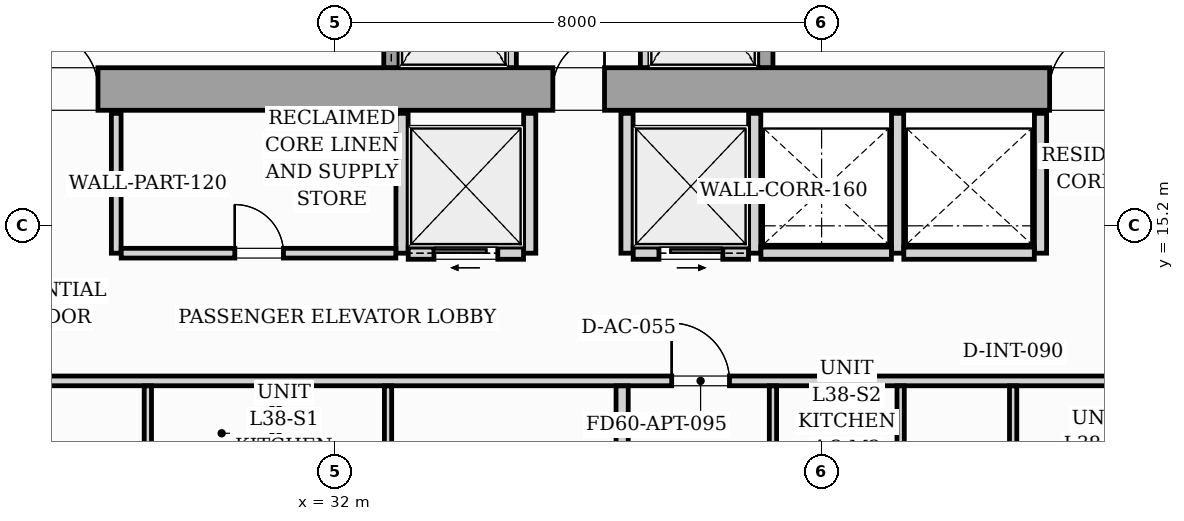
"""IFC4 building model, lengths in metres.
Left out: names, types, materials, properties, quantities, classifications, styles, units other than length and angle.
Written with IfcOpenShell. Run it as: python <this file> out.ifc"""

import sys

from ifc_helpers import new_model, si_unit, direction, frame, frame_2d, origin, origin_2d, place, context, subcontext, project, spatial, rectangle, i_section, extrude, source, transform, mapped, element, fill, save


model = new_model("IFC4")
c1 = context("Model", 3, precision=1e-05, world=origin(), true_north=direction((0.0, 1.0)))
c2 = subcontext(c1, "Body", "Model", "MODEL_VIEW")
j1 = project(units=[si_unit("LENGTHUNIT", "METRE"), si_unit("PLANEANGLEUNIT", "RADIAN")], contexts=[c1])
p1 = place(None, origin())
s1 = spatial("IfcSite", under=j1, at=p1, CompositionType="ELEMENT")
p2 = place(p1, origin())
s2 = spatial("IfcBuilding", under=s1, at=p2, CompositionType="ELEMENT")
p3 = place(p2, frame((0.0, 0.0, 134.2)))
s3 = spatial("IfcBuildingStorey", under=s2, at=p3, CompositionType="ELEMENT", Elevation=134.2)
m1 = source(origin(), c2, "Body", "SweptSolid", [
    extrude(i_section(OverallWidth=0.421, OverallDepth=0.465, WebThickness=0.045, FlangeThickness=0.073, FilletRadius=0.018, at=origin_2d()), origin(), (0.0, 0.0, 1.0), 3.196),
])
for number, where, z_axis, x_axis in (
    (1, (33.12, 17.4, 0.002), (0.0, 0.0, 1.0), (1.0, 0.0, 0.0)),
    (2, (38.88, 17.4, 0.002), (0.0, 0.0, 1.0), (1.0, 0.0, 0.0)),
):
    element("IfcColumn", number, at=place(p3, frame(where, z_axis=z_axis, x_axis=x_axis)), inside=s3, PredefinedType="PILASTER", context=c2, shape_type="MappedRepresentation", body=[
        mapped(m1, transform((0.0, 0.0, 0.0), scale=1.0)),
    ])
p4 = place(p3, frame((26.1, 17.45, 0.0), z_axis=(0.0, 0.0, 1.0), x_axis=(1.0, 0.0, 0.0)))
e3 = element("IfcWall", 3, at=p4, inside=s3, PredefinedType="SHEAR", context=c2, shape_type="SweptSolid", body=[
    extrude(rectangle(XDim=19.8, YDim=0.7, at=frame_2d((9.9, 0.0))), origin(), (0.0, 0.0, 1.0), 3.2),
])
p5 = place(p4, frame((1.05, 0.0, 0.0)))
e4 = element("IfcOpeningElement", 4, at=p5, cuts=e3, PredefinedType="OPENING", context=c2, shape_type="SweptSolid", body=[
    extrude(rectangle(XDim=0.95, YDim=2.06, at=frame_2d((0.475, 1.03))), frame((0.0, 0.36, 0.0), z_axis=(0.0, -1.0, 0.0), x_axis=(1.0, 0.0, 0.0)), (0.0, 0.0, 1.0), 0.72),
])
p6 = place(p4, frame((9.48, 0.0, 0.0)))
e5 = element("IfcOpeningElement", 5, at=p6, cuts=e3, PredefinedType="OPENING", context=c2, shape_type="SweptSolid", body=[
    extrude(rectangle(XDim=0.85, YDim=2.0, at=frame_2d((0.425, 1.0))), frame((0.0, 0.36, 0.0), z_axis=(0.0, -1.0, 0.0), x_axis=(1.0, 0.0, 0.0)), (0.0, 0.0, 1.0), 0.72),
])
p7 = place(p4, frame((17.65, 0.0, 0.0)))
e6 = element("IfcOpeningElement", 6, at=p7, cuts=e3, PredefinedType="OPENING", context=c2, shape_type="SweptSolid", body=[
    extrude(rectangle(XDim=0.95, YDim=2.06, at=frame_2d((0.475, 1.03))), frame((0.0, 0.36, 0.0), z_axis=(0.0, -1.0, 0.0), x_axis=(1.0, 0.0, 0.0)), (0.0, 0.0, 1.0), 0.72),
])
p8 = place(p3, frame((32.925, 17.802, 0.0), z_axis=(0.0, 0.0, 1.0), x_axis=(0.0, 1.0, 0.0)))
e7 = element("IfcWall", 7, at=p8, inside=s3, PredefinedType="SOLIDWALL", context=c2, shape_type="SweptSolid", body=[
    extrude(rectangle(XDim=2.646, YDim=0.25, at=frame_2d((1.323, 0.0))), origin(), (0.0, 0.0, 1.0), 3.2),
])
p9 = place(p8, frame((0.598, 0.0, 0.0)))
e8 = element("IfcOpeningElement", 8, at=p9, cuts=e7, PredefinedType="OPENING", context=c2, shape_type="SweptSolid", body=[
    extrude(rectangle(XDim=1.1, YDim=2.08, at=frame_2d((0.55, 1.04))), frame((0.0, 0.135, 0.0), z_axis=(0.0, -1.0, 0.0), x_axis=(1.0, 0.0, 0.0)), (0.0, 0.0, 1.0), 0.27),
])
for number, where, z_axis, x_axis in (
    (9, (34.9, 17.802, 0.0), (0.0, 0.0, 1.0), (0.0, 1.0, 0.0)),
    (10, (37.1, 17.802, 0.0), (0.0, 0.0, 1.0), (0.0, 1.0, 0.0)),
):
    element("IfcWall", number, at=place(p3, frame(where, z_axis=z_axis, x_axis=x_axis)), inside=s3, PredefinedType="PARTITIONING", context=c2, shape_type="SweptSolid", body=[
        extrude(rectangle(XDim=2.646, YDim=0.16, at=frame_2d((1.323, 0.0))), origin(), (0.0, 0.0, 1.0), 2.94),
    ])
p10 = place(p3, frame((39.075, 17.802, 0.0), z_axis=(0.0, 0.0, 1.0), x_axis=(0.0, 1.0, 0.0)))
e11 = element("IfcWall", 11, at=p10, inside=s3, PredefinedType="SOLIDWALL", context=c2, shape_type="SweptSolid", body=[
    extrude(rectangle(XDim=2.646, YDim=0.25, at=frame_2d((1.323, 0.0))), origin(), (0.0, 0.0, 1.0), 3.2),
])
p11 = place(p10, frame((0.598, 0.0, 0.0)))
e12 = element("IfcOpeningElement", 12, at=p11, cuts=e11, PredefinedType="OPENING", context=c2, shape_type="SweptSolid", body=[
    extrude(rectangle(XDim=1.1, YDim=2.08, at=frame_2d((0.55, 1.04))), frame((0.0, 0.135, 0.0), z_axis=(0.0, -1.0, 0.0), x_axis=(1.0, 0.0, 0.0)), (0.0, 0.0, 1.0), 0.27),
])
p12 = place(p3, frame((28.4, 14.75, 0.0), z_axis=(0.0, 0.0, 1.0), x_axis=(0.0, 1.0, 0.0)))
e13 = element("IfcWall", 13, at=p12, inside=s3, PredefinedType="PARTITIONING", context=c2, shape_type="SweptSolid", body=[
    extrude(rectangle(XDim=2.3, YDim=0.16, at=frame_2d((1.15, 0.0))), origin(), (0.0, 0.0, 1.0), 2.94),
])
p13 = place(p3, frame((33.1, 14.75, 0.0), z_axis=(0.0, 0.0, 1.0), x_axis=(0.0, 1.0, 0.0)))
e14 = element("IfcWall", 14, at=p13, inside=s3, PredefinedType="PARTITIONING", context=c2, shape_type="SweptSolid", body=[
    extrude(rectangle(XDim=2.3, YDim=0.2, at=frame_2d((1.15, 0.0))), origin(), (0.0, 0.0, 1.0), 2.94),
])
p14 = place(p3, frame((28.482, 14.75, 0.0), z_axis=(0.0, 0.0, 1.0), x_axis=(1.0, 0.0, 0.0)))
e15 = element("IfcWall", 15, at=p14, inside=s3, PredefinedType="PARTITIONING", context=c2, shape_type="SweptSolid", body=[
    extrude(rectangle(XDim=4.516, YDim=0.16, at=frame_2d((2.258, 0.0))), origin(), (0.0, 0.0, 1.0), 2.94),
])
p15 = place(p14, frame((1.868, 0.0, 0.0)))
e16 = element("IfcOpeningElement", 16, at=p15, cuts=e15, PredefinedType="OPENING", context=c2, shape_type="SweptSolid", body=[
    extrude(rectangle(XDim=0.8, YDim=2.05, at=frame_2d((0.4, 1.025))), frame((0.0, 0.09, 0.0), z_axis=(0.0, -1.0, 0.0), x_axis=(1.0, 0.0, 0.0)), (0.0, 0.0, 1.0), 0.18),
])
p16 = place(p3, frame((35.2, 14.75, 0.0), z_axis=(0.0, 0.0, 1.0), x_axis=(0.0, 1.0, 0.0)))
e17 = element("IfcWall", 17, at=p16, inside=s3, PredefinedType="PARTITIONING", context=c2, shape_type="SweptSolid", body=[
    extrude(rectangle(XDim=2.3, YDim=0.2, at=frame_2d((1.15, 0.0))), origin(), (0.0, 0.0, 1.0), 2.94),
])
p17 = place(p3, frame((33.202, 14.75, 0.0), z_axis=(0.0, 0.0, 1.0), x_axis=(1.0, 0.0, 0.0)))
e18 = element("IfcWall", 18, at=p17, inside=s3, PredefinedType="PARTITIONING", context=c2, shape_type="SweptSolid", body=[
    extrude(rectangle(XDim=1.896, YDim=0.2, at=frame_2d((0.948, 0.0))), origin(), (0.0, 0.0, 1.0), 2.94),
])
p18 = place(p17, frame((0.423, 0.0, 0.0)))
e19 = element("IfcOpeningElement", 19, at=p18, cuts=e18, PredefinedType="OPENING", context=c2, shape_type="SweptSolid", body=[
    extrude(rectangle(XDim=1.05, YDim=2.08, at=frame_2d((0.525, 1.04))), frame((0.0, 0.11, 0.0), z_axis=(0.0, -1.0, 0.0), x_axis=(1.0, 0.0, 0.0)), (0.0, 0.0, 1.0), 0.22),
])
for number, where, z_axis, x_axis in (
    (20, (36.8, 14.75, 0.0), (0.0, 0.0, 1.0), (0.0, 1.0, 0.0)),
    (21, (38.9, 14.75, 0.0), (0.0, 0.0, 1.0), (0.0, 1.0, 0.0)),
):
    element("IfcWall", number, at=place(p3, frame(where, z_axis=z_axis, x_axis=x_axis)), inside=s3, PredefinedType="PARTITIONING", context=c2, shape_type="SweptSolid", body=[
        extrude(rectangle(XDim=2.3, YDim=0.2, at=frame_2d((1.15, 0.0))), origin(), (0.0, 0.0, 1.0), 2.94),
    ])
p19 = place(p3, frame((36.902, 14.75, 0.0), z_axis=(0.0, 0.0, 1.0), x_axis=(1.0, 0.0, 0.0)))
e22 = element("IfcWall", 22, at=p19, inside=s3, PredefinedType="PARTITIONING", context=c2, shape_type="SweptSolid", body=[
    extrude(rectangle(XDim=1.896, YDim=0.2, at=frame_2d((0.948, 0.0))), origin(), (0.0, 0.0, 1.0), 2.94),
])
p20 = place(p19, frame((0.423, 0.0, 0.0)))
e23 = element("IfcOpeningElement", 23, at=p20, cuts=e22, PredefinedType="OPENING", context=c2, shape_type="SweptSolid", body=[
    extrude(rectangle(XDim=1.05, YDim=2.08, at=frame_2d((0.525, 1.04))), frame((0.0, 0.11, 0.0), z_axis=(0.0, -1.0, 0.0), x_axis=(1.0, 0.0, 0.0)), (0.0, 0.0, 1.0), 0.22),
])
for number, where, z_axis, x_axis in (
    (24, (41.25, 14.75, 0.0), (0.0, 0.0, 1.0), (0.0, 1.0, 0.0)),
    (25, (43.6, 14.75, 0.0), (0.0, 0.0, 1.0), (0.0, 1.0, 0.0)),
):
    element("IfcWall", number, at=place(p3, frame(where, z_axis=z_axis, x_axis=x_axis)), inside=s3, PredefinedType="PARTITIONING", context=c2, shape_type="SweptSolid", body=[
        extrude(rectangle(XDim=2.3, YDim=0.2, at=frame_2d((1.15, 0.0))), origin(), (0.0, 0.0, 1.0), 2.94),
    ])
for number, where, z_axis, x_axis in (
    (26, (39.002, 14.75, 0.0), (0.0, 0.0, 1.0), (1.0, 0.0, 0.0)),
    (27, (41.352, 14.75, 0.0), (0.0, 0.0, 1.0), (1.0, 0.0, 0.0)),
):
    element("IfcWall", number, at=place(p3, frame(where, z_axis=z_axis, x_axis=x_axis)), inside=s3, PredefinedType="PARTITIONING", context=c2, shape_type="SweptSolid", body=[
        extrude(rectangle(XDim=2.146, YDim=0.2, at=frame_2d((1.073, 0.0))), origin(), (0.0, 0.0, 1.0), 2.94),
    ])
p21 = place(p3, frame((22.05, 12.65, 0.0), z_axis=(0.0, 0.0, 1.0), x_axis=(1.0, 0.0, 0.0)))
e28 = element("IfcWall", 28, at=p21, inside=s3, PredefinedType="PARTITIONING", context=c2, shape_type="SweptSolid", body=[
    extrude(rectangle(XDim=23.83, YDim=0.16, at=frame_2d((11.915, 0.0))), origin(), (0.0, 0.0, 1.0), 2.94),
])
p22 = place(p21, frame((3.0, 0.0, 0.0)))
e29 = element("IfcOpeningElement", 29, at=p22, cuts=e28, PredefinedType="OPENING", context=c2, shape_type="SweptSolid", body=[
    extrude(rectangle(XDim=0.95, YDim=2.06, at=frame_2d((0.475, 1.03))), frame((0.0, 0.09, 0.0), z_axis=(0.0, -1.0, 0.0), x_axis=(1.0, 0.0, 0.0)), (0.0, 0.0, 1.0), 0.18),
])
p23 = place(p21, frame((15.485, 0.0, 0.0)))
e30 = element("IfcOpeningElement", 30, at=p23, cuts=e28, PredefinedType="OPENING", context=c2, shape_type="SweptSolid", body=[
    extrude(rectangle(XDim=0.95, YDim=2.06, at=frame_2d((0.475, 1.03))), frame((0.0, 0.09, 0.0), z_axis=(0.0, -1.0, 0.0), x_axis=(1.0, 0.0, 0.0)), (0.0, 0.0, 1.0), 0.18),
])
p24 = place(p3, frame((32.87, 7.028, 0.0), z_axis=(0.0, 0.0, 1.0), x_axis=(0.0, 1.0, 0.0)))
e31 = element("IfcWall", 31, at=p24, inside=s3, PredefinedType="PARTITIONING", context=c2, shape_type="SweptSolid", body=[
    extrude(rectangle(XDim=5.54, YDim=0.12, at=frame_2d((2.77, 0.0))), origin(), (0.0, 0.0, 1.0), 2.94),
])
p25 = place(p24, frame((2.272, 0.0, 0.0)))
e32 = element("IfcOpeningElement", 32, at=p25, cuts=e31, PredefinedType="OPENING", context=c2, shape_type="SweptSolid", body=[
    extrude(rectangle(XDim=0.9, YDim=2.05, at=frame_2d((0.45, 1.025))), frame((0.0, 0.07, 0.0), z_axis=(0.0, -1.0, 0.0), x_axis=(1.0, 0.0, 0.0)), (0.0, 0.0, 1.0), 0.14),
])
for number, where, z_axis, x_axis in (
    (33, (31.02, 10.462, 0.0), (0.0, 0.0, 1.0), (0.0, 1.0, 0.0)),
    (34, (28.92, 10.462, 0.0), (0.0, 0.0, 1.0), (0.0, 1.0, 0.0)),
):
    element("IfcWall", number, at=place(p3, frame(where, z_axis=z_axis, x_axis=x_axis)), inside=s3, PredefinedType="PARTITIONING", context=c2, shape_type="SweptSolid", body=[
        extrude(rectangle(XDim=2.106, YDim=0.12, at=frame_2d((1.053, 0.0))), origin(), (0.0, 0.0, 1.0), 2.94),
    ])
p26 = place(p3, frame((36.72, 6.658, 0.0), z_axis=(0.0, 0.0, 1.0), x_axis=(0.0, 1.0, 0.0)))
e35 = element("IfcWall", 35, at=p26, inside=s3, PredefinedType="PARTITIONING", context=c2, shape_type="SweptSolid", body=[
    extrude(rectangle(XDim=5.91, YDim=0.2, at=frame_2d((2.955, 0.0))), origin(), (0.0, 0.0, 1.0), 2.94),
])
p27 = place(p3, frame((43.15, 6.221, 0.0), z_axis=(0.0, 0.0, 1.0), x_axis=(0.0, 1.0, 0.0)))
e36 = element("IfcWall", 36, at=p27, inside=s3, PredefinedType="PARTITIONING", context=c2, shape_type="SweptSolid", body=[
    extrude(rectangle(XDim=6.347, YDim=0.12, at=frame_2d((3.173, 0.0))), origin(), (0.0, 0.0, 1.0), 2.94),
])
p28 = place(p27, frame((3.079, 0.0, 0.0)))
e37 = element("IfcOpeningElement", 37, at=p28, cuts=e36, PredefinedType="OPENING", context=c2, shape_type="SweptSolid", body=[
    extrude(rectangle(XDim=0.9, YDim=2.05, at=frame_2d((0.45, 1.025))), frame((0.0, 0.07, 0.0), z_axis=(0.0, -1.0, 0.0), x_axis=(1.0, 0.0, 0.0)), (0.0, 0.0, 1.0), 0.14),
])
for number, where, z_axis, x_axis in (
    (38, (41.3, 10.462, 0.0), (0.0, 0.0, 1.0), (0.0, 1.0, 0.0)),
    (39, (39.2, 10.462, 0.0), (0.0, 0.0, 1.0), (0.0, 1.0, 0.0)),
):
    element("IfcWall", number, at=place(p3, frame(where, z_axis=z_axis, x_axis=x_axis)), inside=s3, PredefinedType="PARTITIONING", context=c2, shape_type="SweptSolid", body=[
        extrude(rectangle(XDim=2.106, YDim=0.12, at=frame_2d((1.053, 0.0))), origin(), (0.0, 0.0, 1.0), 2.94),
    ])
m2 = source(origin(), c2, "Body", "SweptSolid", [
    extrude(rectangle(XDim=0.95, YDim=2.06, at=frame_2d((0.475, 1.03))), frame((0.0, 0.025, 0.0), z_axis=(0.0, -1.0, 0.0), x_axis=(1.0, 0.0, 0.0)), (0.0, 0.0, 1.0), 0.05),
])
p29 = place(p5, origin())
e40 = element("IfcDoor", 40, at=p29, inside=s3, OperationType="SINGLE_SWING_LEFT", PredefinedType="DOOR", context=c2, shape_type="MappedRepresentation", body=[
    mapped(m2, transform((0.0, 0.0, 0.0), scale=1.0)),
])
fill(e4, e40)
m3 = source(origin(), c2, "Body", "SweptSolid", [
    extrude(rectangle(XDim=0.85, YDim=2.0, at=frame_2d((0.425, 1.0))), frame((0.0, 0.025, 0.0), z_axis=(0.0, -1.0, 0.0), x_axis=(1.0, 0.0, 0.0)), (0.0, 0.0, 1.0), 0.05),
])
p30 = place(p6, origin())
e41 = element("IfcDoor", 41, at=p30, inside=s3, OperationType="SINGLE_SWING_RIGHT", PredefinedType="DOOR", context=c2, shape_type="MappedRepresentation", body=[
    mapped(m3, transform((0.0, 0.0, 0.0), scale=1.0)),
])
fill(e5, e41)
p31 = place(p7, origin())
e42 = element("IfcDoor", 42, at=p31, inside=s3, OperationType="SINGLE_SWING_RIGHT", PredefinedType="DOOR", context=c2, shape_type="MappedRepresentation", body=[
    mapped(m2, transform((0.0, 0.0, 0.0), scale=1.0)),
])
fill(e6, e42)
m4 = source(origin(), c2, "Body", "SweptSolid", [
    extrude(rectangle(XDim=0.8, YDim=2.05, at=frame_2d((0.4, 1.025))), frame((0.0, 0.025, 0.0), z_axis=(0.0, -1.0, 0.0), x_axis=(1.0, 0.0, 0.0)), (0.0, 0.0, 1.0), 0.05),
])
p32 = place(p15, origin())
e43 = element("IfcDoor", 43, at=p32, inside=s3, OperationType="SINGLE_SWING_LEFT", PredefinedType="DOOR", context=c2, shape_type="MappedRepresentation", body=[
    mapped(m4, transform((0.0, 0.0, 0.0), scale=1.0)),
])
fill(e16, e43)
m5 = source(origin(), c2, "Body", "SweptSolid", [
    extrude(rectangle(XDim=1.05, YDim=2.08, at=frame_2d((0.525, 1.04))), frame((0.0, 0.025, 0.0), z_axis=(0.0, -1.0, 0.0), x_axis=(1.0, 0.0, 0.0)), (0.0, 0.0, 1.0), 0.05),
])
p33 = place(p18, origin())
e44 = element("IfcDoor", 44, at=p33, inside=s3, OperationType="SLIDING_TO_LEFT", PredefinedType="DOOR", context=c2, shape_type="MappedRepresentation", body=[
    mapped(m5, transform((0.0, 0.0, 0.0), scale=1.0)),
])
fill(e19, e44)
p34 = place(p20, origin())
e45 = element("IfcDoor", 45, at=p34, inside=s3, OperationType="SLIDING_TO_RIGHT", PredefinedType="DOOR", context=c2, shape_type="MappedRepresentation", body=[
    mapped(m5, transform((0.0, 0.0, 0.0), scale=1.0)),
])
fill(e23, e45)
m6 = source(origin(), c2, "Body", "SweptSolid", [
    extrude(rectangle(XDim=0.95, YDim=2.06, at=frame_2d((0.475, 1.03))), frame((0.0, 0.025, 0.0), z_axis=(0.0, -1.0, 0.0), x_axis=(1.0, 0.0, 0.0)), (0.0, 0.0, 1.0), 0.05),
])
p35 = place(p23, origin())
e46 = element("IfcDoor", 46, at=p35, inside=s3, OperationType="SINGLE_SWING_LEFT", PredefinedType="DOOR", context=c2, shape_type="MappedRepresentation", body=[
    mapped(m6, transform((0.0, 0.0, 0.0), scale=1.0)),
])
fill(e30, e46)
save(model, sys.argv[1])
